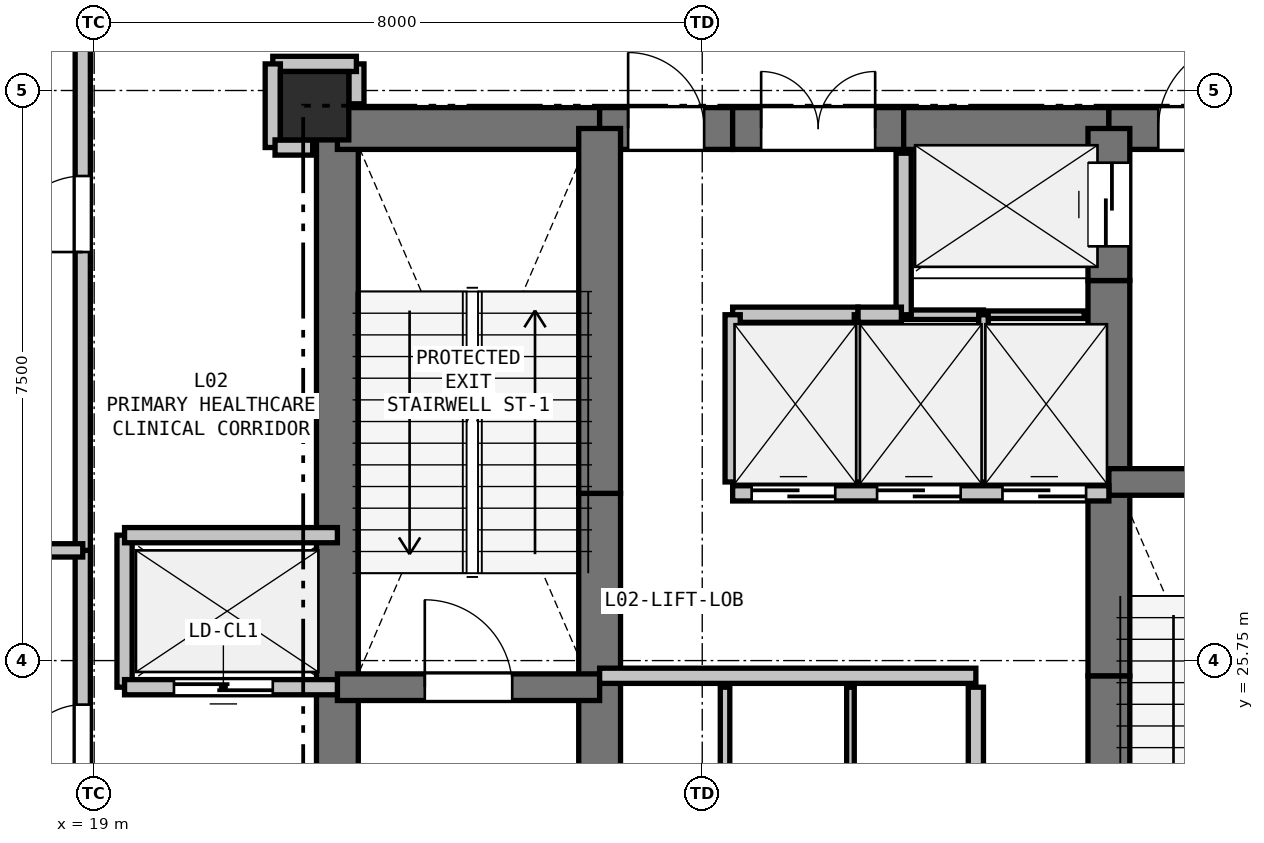
"""IFC4 building model, lengths in metres.
Left out: names, types, materials, properties, quantities, classifications, styles, units other than length and angle.
Written with IfcOpenShell. Run it as: python <this file> out.ifc"""

import sys

from ifc_helpers import new_model, si_unit, direction, frame, frame_2d, origin, origin_2d, place, context, subcontext, project, spatial, rectangle, extrude, element, fill, save


model = new_model("IFC4")
c1 = context("Model", 3, precision=1e-05, world=origin(), true_north=direction((0.0, 1.0)))
c2 = subcontext(c1, "Body", "Model", "MODEL_VIEW")
j1 = project(units=[si_unit("LENGTHUNIT", "METRE"), si_unit("PLANEANGLEUNIT", "RADIAN")], contexts=[c1])
p1 = place(None, origin())
s1 = spatial("IfcSite", under=j1, at=p1, CompositionType="ELEMENT")
p2 = place(p1, origin())
s2 = spatial("IfcBuilding", under=s1, at=p2, CompositionType="ELEMENT")
p3 = place(p2, frame((0.0, 0.0, 9.6)))
s3 = spatial("IfcBuildingStorey", under=s2, at=p3, CompositionType="ELEMENT", Elevation=9.6)
p4 = place(p3, frame((21.9, 33.05, 0.0), z_axis=(0.0, 0.0, 1.0), x_axis=(1.0, 0.0, 0.0)))
e1 = element("IfcColumn", 1, at=p4, inside=s3, PredefinedType="COLUMN", context=c2, shape_type="SweptSolid", body=[
    extrude(rectangle(XDim=0.9, YDim=0.9, at=origin_2d()), origin(), (0.0, 0.0, 1.0), 4.8),
])
p5 = place(p3, frame((22.2, 20.75, 0.0), z_axis=(0.0, 0.0, 1.0), x_axis=(0.0, 1.0, 0.0)))
e2 = element("IfcWall", 2, at=p5, inside=s3, PredefinedType="SHEAR", context=c2, shape_type="SweptSolid", body=[
    extrude(rectangle(XDim=4.65, YDim=0.55, at=frame_2d((2.325, 0.0))), origin(), (0.0, 0.0, 1.0), 4.48),
])
p6 = place(p3, frame((22.2, 25.4, 0.0), z_axis=(0.0, 0.0, 1.0), x_axis=(0.0, 1.0, 0.0)))
e3 = element("IfcWall", 3, at=p6, inside=s3, PredefinedType="SHEAR", context=c2, shape_type="SweptSolid", body=[
    extrude(rectangle(XDim=7.35, YDim=0.55, at=frame_2d((3.675, 0.0))), origin(), (0.0, 0.0, 1.0), 4.48),
])
p7 = place(p3, frame((22.2, 32.75, 0.0), z_axis=(0.0, 0.0, 1.0), x_axis=(1.0, 0.0, 0.0)))
e4 = element("IfcWall", 4, at=p7, inside=s3, PredefinedType="SHEAR", context=c2, shape_type="SweptSolid", body=[
    extrude(rectangle(XDim=3.45, YDim=0.55, at=frame_2d((1.725, 0.0))), origin(), (0.0, 0.0, 1.0), 4.48),
])
p8 = place(p3, frame((25.65, 32.75, 0.0), z_axis=(0.0, 0.0, 1.0), x_axis=(1.0, 0.0, 0.0)))
e5 = element("IfcWall", 5, at=p8, inside=s3, PredefinedType="SHEAR", context=c2, shape_type="SweptSolid", body=[
    extrude(rectangle(XDim=1.75, YDim=0.55, at=frame_2d((0.875, 0.0))), origin(), (0.0, 0.0, 1.0), 4.48),
])
p9 = place(p8, frame((0.375, 0.0, 0.0)))
e6 = element("IfcOpeningElement", 6, at=p9, cuts=e5, PredefinedType="OPENING", context=c2, shape_type="SweptSolid", body=[
    extrude(rectangle(XDim=1.0, YDim=2.15, at=frame_2d((0.5, 1.075))), frame((0.0, 0.285, 0.0), z_axis=(0.0, -1.0, 0.0), x_axis=(1.0, 0.0, 0.0)), (0.0, 0.0, 1.0), 0.57),
])
p10 = place(p3, frame((27.4, 32.75, 0.0), z_axis=(0.0, 0.0, 1.0), x_axis=(1.0, 0.0, 0.0)))
e7 = element("IfcWall", 7, at=p10, inside=s3, PredefinedType="SHEAR", context=c2, shape_type="SweptSolid", body=[
    extrude(rectangle(XDim=2.25, YDim=0.55, at=frame_2d((1.125, 0.0))), origin(), (0.0, 0.0, 1.0), 4.48),
])
p11 = place(p10, frame((0.375, 0.0, 0.0)))
e8 = element("IfcOpeningElement", 8, at=p11, cuts=e7, PredefinedType="OPENING", context=c2, shape_type="SweptSolid", body=[
    extrude(rectangle(XDim=1.5, YDim=2.2, at=frame_2d((0.75, 1.1))), frame((0.0, 0.285, 0.0), z_axis=(0.0, -1.0, 0.0), x_axis=(1.0, 0.0, 0.0)), (0.0, 0.0, 1.0), 0.57),
])
p12 = place(p3, frame((29.65, 32.75, 0.0), z_axis=(0.0, 0.0, 1.0), x_axis=(1.0, 0.0, 0.0)))
e9 = element("IfcWall", 9, at=p12, inside=s3, PredefinedType="SHEAR", context=c2, shape_type="SweptSolid", body=[
    extrude(rectangle(XDim=2.7, YDim=0.55, at=frame_2d((1.35, 0.0))), origin(), (0.0, 0.0, 1.0), 4.48),
])
p13 = place(p3, frame((32.35, 32.75, 0.0), z_axis=(0.0, 0.0, 1.0), x_axis=(1.0, 0.0, 0.0)))
e10 = element("IfcWall", 10, at=p13, inside=s3, PredefinedType="SHEAR", context=c2, shape_type="SweptSolid", body=[
    extrude(rectangle(XDim=3.45, YDim=0.55, at=frame_2d((1.725, 0.0))), origin(), (0.0, 0.0, 1.0), 4.48),
])
p14 = place(p13, frame((0.65, 0.0, 0.0)))
e11 = element("IfcOpeningElement", 11, at=p14, cuts=e10, PredefinedType="OPENING", context=c2, shape_type="SweptSolid", body=[
    extrude(rectangle(XDim=1.15, YDim=2.15, at=frame_2d((0.575, 1.075))), frame((0.0, 0.285, 0.0), z_axis=(0.0, -1.0, 0.0), x_axis=(1.0, 0.0, 0.0)), (0.0, 0.0, 1.0), 0.57),
])
p15 = place(p3, frame((25.65, 22.75, 0.0), z_axis=(0.0, 0.0, 1.0), x_axis=(0.0, 1.0, 0.0)))
e12 = element("IfcWall", 12, at=p15, inside=s3, PredefinedType="SHEAR", context=c2, shape_type="SweptSolid", body=[
    extrude(rectangle(XDim=2.8, YDim=0.55, at=frame_2d((1.4, 0.0))), origin(), (0.0, 0.0, 1.0), 4.48),
])
p16 = place(p3, frame((25.65, 25.55, 0.0), z_axis=(0.0, 0.0, 1.0), x_axis=(0.0, 1.0, 0.0)))
e13 = element("IfcWall", 13, at=p16, inside=s3, PredefinedType="SHEAR", context=c2, shape_type="SweptSolid", body=[
    extrude(rectangle(XDim=2.4, YDim=0.55, at=frame_2d((1.2, 0.0))), origin(), (0.0, 0.0, 1.0), 4.48),
])
for number, where, z_axis, x_axis in (
    (14, (25.65, 27.95, 0.0), (0.0, 0.0, 1.0), (0.0, 1.0, 0.0)),
    (15, (32.35, 20.75, 0.0), (0.0, 0.0, 1.0), (0.0, 1.0, 0.0)),
):
    element("IfcWall", number, at=place(p3, frame(where, z_axis=z_axis, x_axis=x_axis)), inside=s3, PredefinedType="SHEAR", context=c2, shape_type="SweptSolid", body=[
        extrude(rectangle(XDim=4.8, YDim=0.55, at=frame_2d((2.4, 0.0))), origin(), (0.0, 0.0, 1.0), 4.48),
    ])
p17 = place(p3, frame((32.35, 25.55, 0.0), z_axis=(0.0, 0.0, 1.0), x_axis=(0.0, 1.0, 0.0)))
e16 = element("IfcWall", 16, at=p17, inside=s3, PredefinedType="SHEAR", context=c2, shape_type="SweptSolid", body=[
    extrude(rectangle(XDim=2.4, YDim=0.55, at=frame_2d((1.2, 0.0))), origin(), (0.0, 0.0, 1.0), 4.48),
])
p18 = place(p3, frame((32.35, 27.95, 0.0), z_axis=(0.0, 0.0, 1.0), x_axis=(0.0, 1.0, 0.0)))
e17 = element("IfcWall", 17, at=p18, inside=s3, PredefinedType="SHEAR", context=c2, shape_type="SweptSolid", body=[
    extrude(rectangle(XDim=2.8, YDim=0.55, at=frame_2d((1.4, 0.0))), origin(), (0.0, 0.0, 1.0), 4.48),
])
p19 = place(p3, frame((32.35, 30.75, 0.0), z_axis=(0.0, 0.0, 1.0), x_axis=(0.0, 1.0, 0.0)))
e18 = element("IfcWall", 18, at=p19, inside=s3, PredefinedType="SHEAR", context=c2, shape_type="SweptSolid", body=[
    extrude(rectangle(XDim=2.0, YDim=0.55, at=frame_2d((1.0, 0.0))), origin(), (0.0, 0.0, 1.0), 4.48),
])
p20 = place(p19, frame((0.45, 0.0, 0.0)))
e19 = element("IfcOpeningElement", 19, at=p20, cuts=e18, PredefinedType="OPENING", context=c2, shape_type="SweptSolid", body=[
    extrude(rectangle(XDim=1.1, YDim=2.15, at=frame_2d((0.55, 1.075))), frame((0.0, 0.285, 0.0), z_axis=(0.0, -1.0, 0.0), x_axis=(1.0, 0.0, 0.0)), (0.0, 0.0, 1.0), 0.57),
])
p21 = place(p3, frame((22.2, 25.4, 0.0), z_axis=(0.0, 0.0, 1.0), x_axis=(1.0, 0.0, 0.0)))
e20 = element("IfcWall", 20, at=p21, inside=s3, PredefinedType="SHEAR", context=c2, shape_type="SweptSolid", body=[
    extrude(rectangle(XDim=3.45, YDim=0.35, at=frame_2d((1.725, 0.0))), origin(), (0.0, 0.0, 1.0), 4.48),
])
p22 = place(p21, frame((1.15, 0.0, 0.0)))
e21 = element("IfcOpeningElement", 21, at=p22, cuts=e20, PredefinedType="OPENING", context=c2, shape_type="SweptSolid", body=[
    extrude(rectangle(XDim=1.15, YDim=2.15, at=frame_2d((0.575, 1.075))), frame((0.0, 0.185, 0.0), z_axis=(0.0, -1.0, 0.0), x_axis=(1.0, 0.0, 0.0)), (0.0, 0.0, 1.0), 0.37),
])
p23 = place(p3, frame((32.35, 28.1, 0.0), z_axis=(0.0, 0.0, 1.0), x_axis=(1.0, 0.0, 0.0)))
e22 = element("IfcWall", 22, at=p23, inside=s3, PredefinedType="SHEAR", context=c2, shape_type="SweptSolid", body=[
    extrude(rectangle(XDim=3.45, YDim=0.35, at=frame_2d((1.725, 0.0))), origin(), (0.0, 0.0, 1.0), 4.48),
])
p24 = place(p23, frame((1.15, 0.0, 0.0)))
e23 = element("IfcOpeningElement", 23, at=p24, cuts=e22, PredefinedType="OPENING", context=c2, shape_type="SweptSolid", body=[
    extrude(rectangle(XDim=1.15, YDim=2.15, at=frame_2d((0.575, 1.075))), frame((0.0, 0.185, 0.0), z_axis=(0.0, -1.0, 0.0), x_axis=(1.0, 0.0, 0.0)), (0.0, 0.0, 1.0), 0.37),
])
p25 = place(p3, frame((25.65, 25.55, 0.0), z_axis=(0.0, 0.0, 1.0), x_axis=(1.0, 0.0, 0.0)))
e24 = element("IfcWall", 24, at=p25, inside=s3, PredefinedType="PARTITIONING", context=c2, shape_type="SweptSolid", body=[
    extrude(rectangle(XDim=4.95, YDim=0.2, at=frame_2d((2.475, 0.0))), origin(), (0.0, 0.0, 1.0), 4.48),
])
p26 = place(p3, frame((27.4, 27.95, 0.0), z_axis=(0.0, 0.0, 1.0), x_axis=(1.0, 0.0, 0.0)))
e25 = element("IfcWall", 25, at=p26, inside=s3, PredefinedType="PARTITIONING", context=c2, shape_type="SweptSolid", body=[
    extrude(rectangle(XDim=4.95, YDim=0.2, at=frame_2d((2.475, 0.0))), origin(), (0.0, 0.0, 1.0), 4.48),
])
p27 = place(p26, frame((0.25, 0.0, 0.0)))
e26 = element("IfcOpeningElement", 26, at=p27, cuts=e25, PredefinedType="OPENING", context=c2, shape_type="SweptSolid", body=[
    extrude(rectangle(XDim=1.1, YDim=2.15, at=frame_2d((0.55, 1.075))), frame((0.0, 0.11, 0.0), z_axis=(0.0, -1.0, 0.0), x_axis=(1.0, 0.0, 0.0)), (0.0, 0.0, 1.0), 0.22),
])
p28 = place(p26, frame((1.9, 0.0, 0.0)))
e27 = element("IfcOpeningElement", 27, at=p28, cuts=e25, PredefinedType="OPENING", context=c2, shape_type="SweptSolid", body=[
    extrude(rectangle(XDim=1.1, YDim=2.15, at=frame_2d((0.55, 1.075))), frame((0.0, 0.11, 0.0), z_axis=(0.0, -1.0, 0.0), x_axis=(1.0, 0.0, 0.0)), (0.0, 0.0, 1.0), 0.22),
])
p29 = place(p26, frame((3.55, 0.0, 0.0)))
e28 = element("IfcOpeningElement", 28, at=p29, cuts=e25, PredefinedType="OPENING", context=c2, shape_type="SweptSolid", body=[
    extrude(rectangle(XDim=1.1, YDim=2.15, at=frame_2d((0.55, 1.075))), frame((0.0, 0.11, 0.0), z_axis=(0.0, -1.0, 0.0), x_axis=(1.0, 0.0, 0.0)), (0.0, 0.0, 1.0), 0.22),
])
p30 = place(p3, frame((19.4, 25.4, 0.0), z_axis=(0.0, 0.0, 1.0), x_axis=(0.0, 1.0, 0.0)))
e29 = element("IfcWall", 29, at=p30, inside=s3, PredefinedType="PARTITIONING", context=c2, shape_type="SweptSolid", body=[
    extrude(rectangle(XDim=2.0, YDim=0.2, at=frame_2d((1.0, 0.0))), origin(), (0.0, 0.0, 1.0), 4.48),
])
p31 = place(p3, frame((19.4, 27.4, 0.0), z_axis=(0.0, 0.0, 1.0), x_axis=(1.0, 0.0, 0.0)))
e30 = element("IfcWall", 30, at=p31, inside=s3, PredefinedType="PARTITIONING", context=c2, shape_type="SweptSolid", body=[
    extrude(rectangle(XDim=2.8, YDim=0.2, at=frame_2d((1.4, 0.0))), origin(), (0.0, 0.0, 1.0), 3.928),
])
p32 = place(p3, frame((22.2, 25.4, 0.0), z_axis=(0.0, 0.0, 1.0), x_axis=(-1.0, 0.0, 0.0)))
e31 = element("IfcWall", 31, at=p32, inside=s3, PredefinedType="PARTITIONING", context=c2, shape_type="SweptSolid", body=[
    extrude(rectangle(XDim=2.8, YDim=0.2, at=frame_2d((1.4, 0.0))), origin(), (0.0, 0.0, 1.0), 3.928),
])
p33 = place(p32, frame((0.85, 0.0, 0.0)))
e32 = element("IfcOpeningElement", 32, at=p33, cuts=e31, PredefinedType="OPENING", context=c2, shape_type="SweptSolid", body=[
    extrude(rectangle(XDim=1.3, YDim=2.2, at=frame_2d((0.65, 1.1))), frame((0.0, 0.11, 0.0), z_axis=(0.0, -1.0, 0.0), x_axis=(1.0, 0.0, 0.0)), (0.0, 0.0, 1.0), 0.22),
])
p34 = place(p3, frame((32.025, 30.3, 0.0), z_axis=(0.0, 0.0, 1.0), x_axis=(-1.0, 0.0, 0.0)))
e33 = element("IfcWall", 33, at=p34, inside=s3, PredefinedType="PARTITIONING", context=c2, shape_type="SweptSolid", body=[
    extrude(rectangle(XDim=1.325, YDim=0.1, at=frame_2d((0.663, 0.0))), origin(), (0.0, 0.0, 1.0), 4.48),
])
p35 = place(p3, frame((30.7, 30.3, 0.0), z_axis=(0.0, 0.0, 1.0), x_axis=(-1.0, 0.0, 0.0)))
e34 = element("IfcWall", 34, at=p35, inside=s3, PredefinedType="PARTITIONING", context=c2, shape_type="SweptSolid", body=[
    extrude(rectangle(XDim=1.05, YDim=0.125, at=frame_2d((0.525, 0.0))), origin(), (0.0, 0.0, 1.0), 4.48),
])
p36 = place(p3, frame((29.65, 30.3, 0.0), z_axis=(0.0, 0.0, 1.0), x_axis=(0.0, 1.0, 0.0)))
e35 = element("IfcWall", 35, at=p36, inside=s3, PredefinedType="PARTITIONING", context=c2, shape_type="SweptSolid", body=[
    extrude(rectangle(XDim=2.125, YDim=0.2, at=frame_2d((1.062, 0.0))), origin(), (0.0, 0.0, 1.0), 4.48),
])
p37 = place(p3, frame((27.3, 25.4, 0.0), z_axis=(0.0, 0.0, 1.0), x_axis=(0.0, -1.0, 0.0)))
e36 = element("IfcWall", 36, at=p37, inside=s3, PredefinedType="PARTITIONING", context=c2, shape_type="SweptSolid", body=[
    extrude(rectangle(XDim=2.2, YDim=0.125, at=frame_2d((1.1, 0.0))), origin(), (0.0, 0.0, 1.0), 4.48),
])
p38 = place(p3, frame((28.95, 25.4, 0.0), z_axis=(0.0, 0.0, 1.0), x_axis=(0.0, -1.0, 0.0)))
e37 = element("IfcWall", 37, at=p38, inside=s3, PredefinedType="PARTITIONING", context=c2, shape_type="SweptSolid", body=[
    extrude(rectangle(XDim=2.2, YDim=0.1, at=frame_2d((1.1, 0.0))), origin(), (0.0, 0.0, 1.0), 4.48),
])
p39 = place(p3, frame((30.6, 25.4, 0.0), z_axis=(0.0, 0.0, 1.0), x_axis=(0.0, -1.0, 0.0)))
e38 = element("IfcWall", 38, at=p39, inside=s3, PredefinedType="PARTITIONING", context=c2, shape_type="SweptSolid", body=[
    extrude(rectangle(XDim=2.2, YDim=0.2, at=frame_2d((1.1, 0.0))), origin(), (0.0, 0.0, 1.0), 4.48),
])
p40 = place(p3, frame((27.4, 30.3, 0.0), z_axis=(0.0, 0.0, 1.0), x_axis=(1.0, 0.0, 0.0)))
e39 = element("IfcWall", 39, at=p40, inside=s3, PredefinedType="PARTITIONING", context=c2, shape_type="SweptSolid", body=[
    extrude(rectangle(XDim=1.65, YDim=0.2, at=frame_2d((0.825, 0.0))), origin(), (0.0, 0.0, 1.0), 4.48),
])
p41 = place(p3, frame((29.05, 30.3, 0.0), z_axis=(0.0, 0.0, 1.0), x_axis=(0.0, -1.0, 0.0)))
e40 = element("IfcWall", 40, at=p41, inside=s3, PredefinedType="PARTITIONING", context=c2, shape_type="SweptSolid", body=[
    extrude(rectangle(XDim=2.2, YDim=0.1, at=frame_2d((1.1, 0.0))), origin(), (0.0, 0.0, 1.0), 4.48),
])
p42 = place(p3, frame((27.4, 28.1, 0.0), z_axis=(0.0, 0.0, 1.0), x_axis=(0.0, 1.0, 0.0)))
e41 = element("IfcWall", 41, at=p42, inside=s3, PredefinedType="PARTITIONING", context=c2, shape_type="SweptSolid", body=[
    extrude(rectangle(XDim=2.2, YDim=0.2, at=frame_2d((1.1, 0.0))), origin(), (0.0, 0.0, 1.0), 4.48),
])
p43 = place(p3, frame((29.05, 30.3, 0.0), z_axis=(0.0, 0.0, 1.0), x_axis=(1.0, 0.0, 0.0)))
e42 = element("IfcWall", 42, at=p43, inside=s3, PredefinedType="PARTITIONING", context=c2, shape_type="SweptSolid", body=[
    extrude(rectangle(XDim=0.57, YDim=0.2, at=frame_2d((0.285, 0.0))), origin(), (0.0, 0.0, 1.0), 4.48),
])
p44 = place(p3, frame((30.7, 30.3, 0.0), z_axis=(0.0, 0.0, 1.0), x_axis=(0.0, -1.0, 0.0)))
e43 = element("IfcWall", 43, at=p44, inside=s3, PredefinedType="PARTITIONING", context=c2, shape_type="SweptSolid", body=[
    extrude(rectangle(XDim=2.2, YDim=0.125, at=frame_2d((1.1, 0.0))), origin(), (0.0, 0.0, 1.0), 4.48),
])
p45 = place(p3, frame((18.85, 22.8, 0.0), z_axis=(0.0, 0.0, 1.0), x_axis=(0.0, 1.0, 0.0)))
e44 = element("IfcWall", 44, at=p45, inside=s3, PredefinedType="PARTITIONING", context=c2, shape_type="SweptSolid", body=[
    extrude(rectangle(XDim=4.4, YDim=0.2, at=frame_2d((2.2, 0.0))), origin(), (0.0, 0.0, 1.0), 4.48),
])
p46 = place(p45, frame((1.521, 0.0, 0.0)))
e45 = element("IfcOpeningElement", 45, at=p46, cuts=e44, PredefinedType="OPENING", context=c2, shape_type="SweptSolid", body=[
    extrude(rectangle(XDim=0.85, YDim=2.1, at=frame_2d((0.425, 1.05))), frame((0.0, 0.11, 0.0), z_axis=(0.0, -1.0, 0.0), x_axis=(1.0, 0.0, 0.0)), (0.0, 0.0, 1.0), 0.22),
])
p47 = place(p3, frame((18.85, 27.2, 0.0), z_axis=(0.0, 0.0, 1.0), x_axis=(0.0, 1.0, 0.0)))
e46 = element("IfcWall", 46, at=p47, inside=s3, PredefinedType="PARTITIONING", context=c2, shape_type="SweptSolid", body=[
    extrude(rectangle(XDim=8.85, YDim=0.2, at=frame_2d((4.425, 0.0))), origin(), (0.0, 0.0, 1.0), 3.777),
])
p48 = place(p47, frame((3.925, 0.0, 0.0)))
e47 = element("IfcOpeningElement", 47, at=p48, cuts=e46, PredefinedType="OPENING", context=c2, shape_type="SweptSolid", body=[
    extrude(rectangle(XDim=1.0, YDim=2.15, at=frame_2d((0.5, 1.075))), frame((0.0, 0.11, 0.0), z_axis=(0.0, -1.0, 0.0), x_axis=(1.0, 0.0, 0.0)), (0.0, 0.0, 1.0), 0.22),
])
p49 = place(p3, frame((22.45, 33.075, 0.0), z_axis=(0.0, 0.0, 1.0), x_axis=(0.0, 1.0, 0.0)))
e48 = element("IfcWall", 48, at=p49, inside=s3, PredefinedType="PARTITIONING", context=c2, shape_type="SweptSolid", body=[
    extrude(rectangle(XDim=0.525, YDim=0.2, at=frame_2d((0.263, 0.0))), origin(), (0.0, 0.0, 1.0), 3.928),
])
p50 = place(p3, frame((22.45, 33.6, 0.0), z_axis=(0.0, 0.0, 1.0), x_axis=(-1.0, 0.0, 0.0)))
e49 = element("IfcWall", 49, at=p50, inside=s3, PredefinedType="PARTITIONING", context=c2, shape_type="SweptSolid", body=[
    extrude(rectangle(XDim=1.1, YDim=0.2, at=frame_2d((0.55, 0.0))), origin(), (0.0, 0.0, 1.0), 4.48),
])
p51 = place(p3, frame((21.35, 33.6, 0.0), z_axis=(0.0, 0.0, 1.0), x_axis=(0.0, -1.0, 0.0)))
e50 = element("IfcWall", 50, at=p51, inside=s3, PredefinedType="PARTITIONING", context=c2, shape_type="SweptSolid", body=[
    extrude(rectangle(XDim=1.1, YDim=0.2, at=frame_2d((0.55, 0.0))), origin(), (0.0, 0.0, 1.0), 3.777),
])
p52 = place(p3, frame((21.38, 32.5, 0.0), z_axis=(0.0, 0.0, 1.0), x_axis=(1.0, 0.0, 0.0)))
e51 = element("IfcWall", 51, at=p52, inside=s3, PredefinedType="PARTITIONING", context=c2, shape_type="SweptSolid", body=[
    extrude(rectangle(XDim=0.495, YDim=0.2, at=frame_2d((0.248, 0.0))), origin(), (0.0, 0.0, 1.0), 3.928),
])
p53 = place(p3, frame((3.975, 27.2, 0.0), z_axis=(0.0, 0.0, 1.0), x_axis=(1.0, 0.0, 0.0)))
e52 = element("IfcWall", 52, at=p53, inside=s3, PredefinedType="PLUMBINGWALL", context=c2, shape_type="SweptSolid", body=[
    extrude(rectangle(XDim=14.875, YDim=0.175, at=frame_2d((7.438, 0.0))), origin(), (0.0, 0.0, 1.0), 4.09),
])
p54 = place(p27, origin())
e53 = element("IfcDoor", 53, at=p54, inside=s3, OperationType="SLIDING_TO_LEFT", PredefinedType="DOOR", context=c2, shape_type="SweptSolid", body=[
    extrude(rectangle(XDim=1.1, YDim=2.15, at=frame_2d((0.55, 1.075))), frame((0.0, 0.025, 0.0), z_axis=(0.0, -1.0, 0.0), x_axis=(1.0, 0.0, 0.0)), (0.0, 0.0, 1.0), 0.05),
])
fill(e26, e53)
p55 = place(p28, origin())
e54 = element("IfcDoor", 54, at=p55, inside=s3, OperationType="SLIDING_TO_LEFT", PredefinedType="DOOR", context=c2, shape_type="SweptSolid", body=[
    extrude(rectangle(XDim=1.1, YDim=2.15, at=frame_2d((0.55, 1.075))), frame((0.0, 0.025, 0.0), z_axis=(0.0, -1.0, 0.0), x_axis=(1.0, 0.0, 0.0)), (0.0, 0.0, 1.0), 0.05),
])
fill(e27, e54)
p56 = place(p29, origin())
e55 = element("IfcDoor", 55, at=p56, inside=s3, OperationType="SLIDING_TO_LEFT", PredefinedType="DOOR", context=c2, shape_type="SweptSolid", body=[
    extrude(rectangle(XDim=1.1, YDim=2.15, at=frame_2d((0.55, 1.075))), frame((0.0, 0.025, 0.0), z_axis=(0.0, -1.0, 0.0), x_axis=(1.0, 0.0, 0.0)), (0.0, 0.0, 1.0), 0.05),
])
fill(e28, e55)
p57 = place(p9, origin())
e56 = element("IfcDoor", 56, at=p57, inside=s3, OperationType="SINGLE_SWING_LEFT", PredefinedType="DOOR", context=c2, shape_type="SweptSolid", body=[
    extrude(rectangle(XDim=1.0, YDim=2.15, at=frame_2d((0.5, 1.075))), frame((0.0, 0.025, 0.0), z_axis=(0.0, -1.0, 0.0), x_axis=(1.0, 0.0, 0.0)), (0.0, 0.0, 1.0), 0.05),
])
fill(e6, e56)
p58 = place(p20, origin())
e57 = element("IfcDoor", 57, at=p58, inside=s3, OperationType="SLIDING_TO_LEFT", PredefinedType="DOOR", context=c2, shape_type="SweptSolid", body=[
    extrude(rectangle(XDim=1.1, YDim=2.15, at=frame_2d((0.55, 1.075))), frame((0.0, 0.025, 0.0), z_axis=(0.0, -1.0, 0.0), x_axis=(1.0, 0.0, 0.0)), (0.0, 0.0, 1.0), 0.05),
])
fill(e19, e57)
p59 = place(p33, origin())
e58 = element("IfcDoor", 58, at=p59, inside=s3, OperationType="SLIDING_TO_LEFT", PredefinedType="DOOR", context=c2, shape_type="SweptSolid", body=[
    extrude(rectangle(XDim=1.3, YDim=2.2, at=frame_2d((0.65, 1.1))), frame((0.0, 0.025, 0.0), z_axis=(0.0, -1.0, 0.0), x_axis=(1.0, 0.0, 0.0)), (0.0, 0.0, 1.0), 0.05),
])
fill(e32, e58)
p60 = place(p22, origin())
e59 = element("IfcDoor", 59, at=p60, inside=s3, OperationType="SINGLE_SWING_LEFT", PredefinedType="DOOR", context=c2, shape_type="SweptSolid", body=[
    extrude(rectangle(XDim=1.15, YDim=2.15, at=frame_2d((0.575, 1.075))), frame((0.0, 0.025, 0.0), z_axis=(0.0, -1.0, 0.0), x_axis=(1.0, 0.0, 0.0)), (0.0, 0.0, 1.0), 0.05),
])
fill(e21, e59)
p61 = place(p14, origin())
e60 = element("IfcDoor", 60, at=p61, inside=s3, OperationType="SINGLE_SWING_RIGHT", PredefinedType="DOOR", context=c2, shape_type="SweptSolid", body=[
    extrude(rectangle(XDim=1.15, YDim=2.15, at=frame_2d((0.575, 1.075))), frame((0.0, 0.025, 0.0), z_axis=(0.0, -1.0, 0.0), x_axis=(1.0, 0.0, 0.0)), (0.0, 0.0, 1.0), 0.05),
])
fill(e11, e60)
p62 = place(p11, origin())
e61 = element("IfcDoor", 61, at=p62, inside=s3, OperationType="DOUBLE_DOOR_SINGLE_SWING", PredefinedType="DOOR", context=c2, shape_type="SweptSolid", body=[
    extrude(rectangle(XDim=1.5, YDim=2.2, at=frame_2d((0.75, 1.1))), frame((0.0, 0.025, 0.0), z_axis=(0.0, -1.0, 0.0), x_axis=(1.0, 0.0, 0.0)), (0.0, 0.0, 1.0), 0.05),
])
fill(e8, e61)
p63 = place(p46, origin())
e62 = element("IfcDoor", 62, at=p63, inside=s3, OperationType="SINGLE_SWING_LEFT", PredefinedType="DOOR", context=c2, shape_type="SweptSolid", body=[
    extrude(rectangle(XDim=0.85, YDim=2.1, at=frame_2d((0.425, 1.05))), frame((0.0, 0.025, 0.0), z_axis=(0.0, -1.0, 0.0), x_axis=(1.0, 0.0, 0.0)), (0.0, 0.0, 1.0), 0.05),
])
fill(e45, e62)
p64 = place(p48, origin())
e63 = element("IfcDoor", 63, at=p64, inside=s3, OperationType="SINGLE_SWING_LEFT", PredefinedType="DOOR", context=c2, shape_type="SweptSolid", body=[
    extrude(rectangle(XDim=1.0, YDim=2.15, at=frame_2d((0.5, 1.075))), frame((0.0, 0.025, 0.0), z_axis=(0.0, -1.0, 0.0), x_axis=(1.0, 0.0, 0.0)), (0.0, 0.0, 1.0), 0.05),
])
fill(e47, e63)
save(model, sys.argv[1])
